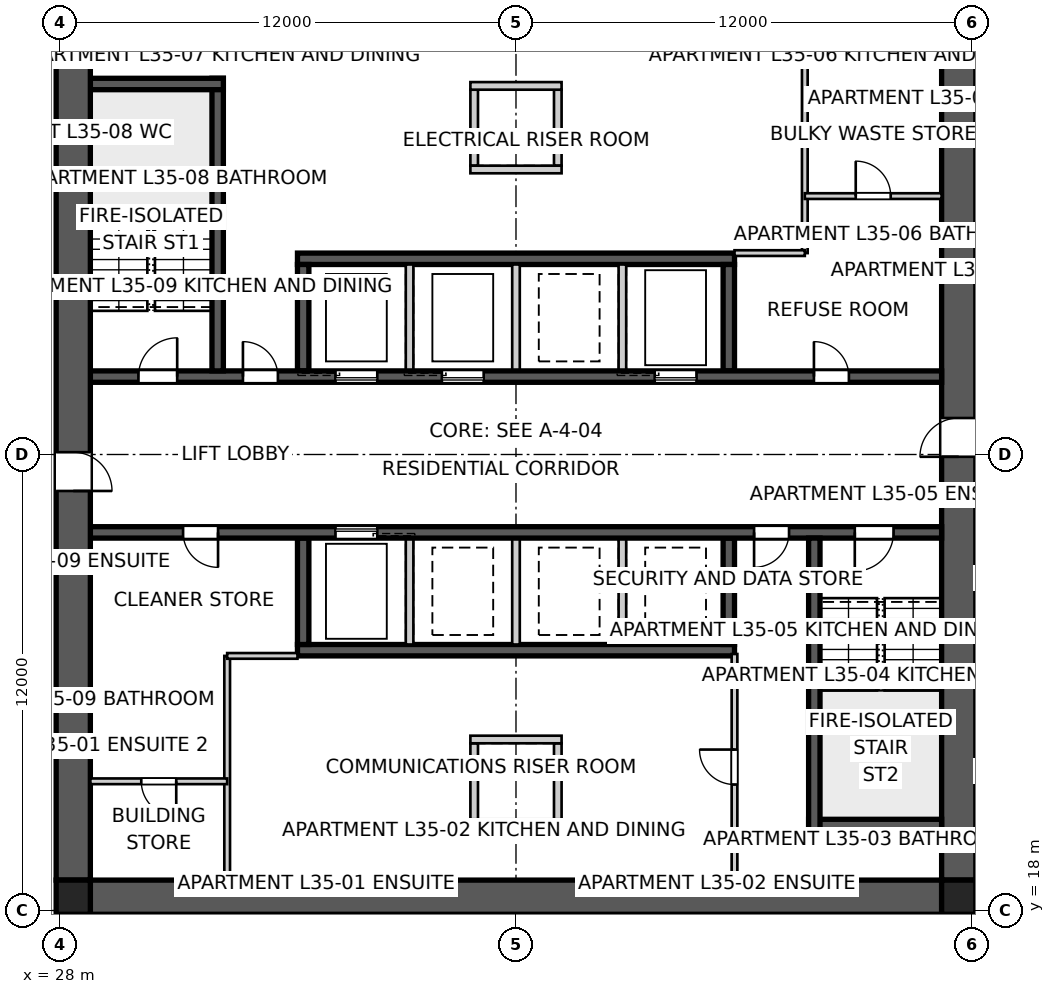
"""IFC4 building model, lengths in metres.
Left out: names, types, materials, properties, quantities, classifications, styles, units other than length and angle.
Written with IfcOpenShell. Run it as: python <this file> out.ifc"""

import sys

from ifc_helpers import new_model, si_unit, direction, frame, frame_2d, origin, origin_2d, place, context, subcontext, project, spatial, polyline, rectangle, outline, extrude, element, fill, save


model = new_model("IFC4")
c1 = context("Model", 3, precision=1e-05, world=origin(), true_north=direction((0.0, 1.0)))
c2 = subcontext(c1, "Body", "Model", "MODEL_VIEW")
j1 = project(units=[si_unit("LENGTHUNIT", "METRE"), si_unit("PLANEANGLEUNIT", "RADIAN")], contexts=[c1])
p1 = place(None, origin())
s1 = spatial("IfcSite", under=j1, at=p1, CompositionType="ELEMENT")
p2 = place(p1, origin())
s2 = spatial("IfcBuilding", under=s1, at=p2, CompositionType="ELEMENT")
p3 = place(p2, frame((0.0, 0.0, 128.6)))
s3 = spatial("IfcBuildingStorey", under=s2, at=p3, CompositionType="ELEMENT", Elevation=128.6)
p4 = place(p3, frame((51.2, 18.35, 0.0), z_axis=(0.0, 0.0, 1.0), x_axis=(-1.0, 0.0, 0.0)))
e1 = element("IfcWall", 1, at=p4, inside=s3, PredefinedType="SHEAR", context=c2, shape_type="SweptSolid", body=[
    extrude(outline(polyline([(0.0, -0.45), (22.4, -0.45), (22.4, -0.025), (22.85, -0.025), (22.85, 0.025), (22.4, 0.025), (22.4, 0.45), (0.0, 0.45), (0.0, 0.025), (-0.45, 0.025), (-0.45, -0.025), (0.0, -0.025), (0.0, -0.45)])), origin(), (0.0, 0.0, 1.0), 3.4),
])
p5 = place(p3, frame((51.65, 18.8, 0.0), z_axis=(0.0, 0.0, 1.0), x_axis=(0.0, 1.0, 0.0)))
e2 = element("IfcWall", 2, at=p5, inside=s3, PredefinedType="SHEAR", context=c2, shape_type="SweptSolid", body=[
    extrude(outline(polyline([(0.0, -0.45), (22.4, -0.45), (22.4, -0.025), (22.85, -0.025), (22.85, 0.025), (22.4, 0.025), (22.4, 0.45), (0.0, 0.45), (0.0, 0.025), (-0.45, 0.025), (-0.45, -0.025), (0.0, -0.025), (0.0, -0.45)])), origin(), (0.0, 0.0, 1.0), 3.4),
])
p6 = place(p5, frame((11.14, 0.0, 0.0)))
e3 = element("IfcOpeningElement", 3, at=p6, cuts=e2, PredefinedType="OPENING", context=c2, shape_type="SweptSolid", body=[
    extrude(rectangle(XDim=1.02, YDim=2.4, at=frame_2d((0.51, 1.2))), frame((0.0, 0.46, 0.0), z_axis=(0.0, -1.0, 0.0), x_axis=(1.0, 0.0, 0.0)), (0.0, 0.0, 1.0), 0.92),
])
p7 = place(p3, frame((28.35, 41.2, 0.0), z_axis=(0.0, 0.0, 1.0), x_axis=(0.0, -1.0, 0.0)))
e4 = element("IfcWall", 4, at=p7, inside=s3, PredefinedType="SHEAR", context=c2, shape_type="SweptSolid", body=[
    extrude(outline(polyline([(0.0, -0.45), (22.4, -0.45), (22.4, -0.025), (22.85, -0.025), (22.85, 0.025), (22.4, 0.025), (22.4, 0.45), (0.0, 0.45), (0.0, 0.025), (-0.45, 0.025), (-0.45, -0.025), (0.0, -0.025), (0.0, -0.45)])), origin(), (0.0, 0.0, 1.0), 3.4),
])
p8 = place(p7, frame((11.14, 0.0, 0.0)))
e5 = element("IfcOpeningElement", 5, at=p8, cuts=e4, PredefinedType="OPENING", context=c2, shape_type="SweptSolid", body=[
    extrude(rectangle(XDim=1.02, YDim=2.4, at=frame_2d((0.51, 1.2))), frame((0.0, 0.46, 0.0), z_axis=(0.0, -1.0, 0.0), x_axis=(1.0, 0.0, 0.0)), (0.0, 0.0, 1.0), 0.92),
])
p9 = place(p3, frame((28.8, 32.05, 0.0), z_axis=(0.0, 0.0, 1.0), x_axis=(1.0, 0.0, 0.0)))
e6 = element("IfcWall", 6, at=p9, inside=s3, PredefinedType="SHEAR", context=c2, shape_type="SweptSolid", body=[
    extrude(rectangle(XDim=22.4, YDim=0.3, at=frame_2d((11.2, 0.0))), origin(), (0.0, 0.0, 1.0), 3.4),
])
p10 = place(p9, frame((19.04, 0.0, 0.0)))
e7 = element("IfcOpeningElement", 7, at=p10, cuts=e6, PredefinedType="OPENING", context=c2, shape_type="SweptSolid", body=[
    extrude(rectangle(XDim=0.92, YDim=2.1, at=frame_2d((0.46, 1.05))), frame((0.0, 0.16, 0.0), z_axis=(0.0, -1.0, 0.0), x_axis=(1.0, 0.0, 0.0)), (0.0, 0.0, 1.0), 0.32),
])
p11 = place(p9, frame((1.265, 0.0, 0.0)))
e8 = element("IfcOpeningElement", 8, at=p11, cuts=e6, PredefinedType="OPENING", context=c2, shape_type="SweptSolid", body=[
    extrude(rectangle(XDim=1.02, YDim=2.1, at=frame_2d((0.51, 1.05))), frame((0.0, 0.16, 0.0), z_axis=(0.0, -1.0, 0.0), x_axis=(1.0, 0.0, 0.0)), (0.0, 0.0, 1.0), 0.32),
])
p12 = place(p9, frame((4.015, 0.0, 0.0)))
e9 = element("IfcOpeningElement", 9, at=p12, cuts=e6, PredefinedType="OPENING", context=c2, shape_type="SweptSolid", body=[
    extrude(rectangle(XDim=0.92, YDim=2.1, at=frame_2d((0.46, 1.05))), frame((0.0, 0.16, 0.0), z_axis=(0.0, -1.0, 0.0), x_axis=(1.0, 0.0, 0.0)), (0.0, 0.0, 1.0), 0.32),
])
p13 = place(p9, frame((6.45, 0.0, 0.0)))
e10 = element("IfcOpeningElement", 10, at=p13, cuts=e6, PredefinedType="OPENING", context=c2, shape_type="SweptSolid", body=[
    extrude(rectangle(XDim=1.1, YDim=2.1, at=frame_2d((0.55, 1.05))), frame((0.0, 0.16, 0.0), z_axis=(0.0, -1.0, 0.0), x_axis=(1.0, 0.0, 0.0)), (0.0, 0.0, 1.0), 0.32),
])
p14 = place(p9, frame((9.25, 0.0, 0.0)))
e11 = element("IfcOpeningElement", 11, at=p14, cuts=e6, PredefinedType="OPENING", context=c2, shape_type="SweptSolid", body=[
    extrude(rectangle(XDim=1.1, YDim=2.1, at=frame_2d((0.55, 1.05))), frame((0.0, 0.16, 0.0), z_axis=(0.0, -1.0, 0.0), x_axis=(1.0, 0.0, 0.0)), (0.0, 0.0, 1.0), 0.32),
])
p15 = place(p9, frame((14.85, 0.0, 0.0)))
e12 = element("IfcOpeningElement", 12, at=p15, cuts=e6, PredefinedType="OPENING", context=c2, shape_type="SweptSolid", body=[
    extrude(rectangle(XDim=1.1, YDim=2.1, at=frame_2d((0.55, 1.05))), frame((0.0, 0.16, 0.0), z_axis=(0.0, -1.0, 0.0), x_axis=(1.0, 0.0, 0.0)), (0.0, 0.0, 1.0), 0.32),
])
p16 = place(p3, frame((51.2, 27.95, 0.0), z_axis=(0.0, 0.0, 1.0), x_axis=(-1.0, 0.0, 0.0)))
e13 = element("IfcWall", 13, at=p16, inside=s3, PredefinedType="SHEAR", context=c2, shape_type="SweptSolid", body=[
    extrude(rectangle(XDim=22.4, YDim=0.3, at=frame_2d((11.2, 0.0))), origin(), (0.0, 0.0, 1.0), 3.4),
])
p17 = place(p16, frame((19.04, 0.0, 0.0)))
e14 = element("IfcOpeningElement", 14, at=p17, cuts=e13, PredefinedType="OPENING", context=c2, shape_type="SweptSolid", body=[
    extrude(rectangle(XDim=0.92, YDim=2.1, at=frame_2d((0.46, 1.05))), frame((0.0, 0.16, 0.0), z_axis=(0.0, -1.0, 0.0), x_axis=(1.0, 0.0, 0.0)), (0.0, 0.0, 1.0), 0.32),
])
p18 = place(p16, frame((1.265, 0.0, 0.0)))
e15 = element("IfcOpeningElement", 15, at=p18, cuts=e13, PredefinedType="OPENING", context=c2, shape_type="SweptSolid", body=[
    extrude(rectangle(XDim=1.02, YDim=2.1, at=frame_2d((0.51, 1.05))), frame((0.0, 0.16, 0.0), z_axis=(0.0, -1.0, 0.0), x_axis=(1.0, 0.0, 0.0)), (0.0, 0.0, 1.0), 0.32),
])
p19 = place(p16, frame((4.015, 0.0, 0.0)))
e16 = element("IfcOpeningElement", 16, at=p19, cuts=e13, PredefinedType="OPENING", context=c2, shape_type="SweptSolid", body=[
    extrude(rectangle(XDim=0.92, YDim=2.1, at=frame_2d((0.46, 1.05))), frame((0.0, 0.16, 0.0), z_axis=(0.0, -1.0, 0.0), x_axis=(1.0, 0.0, 0.0)), (0.0, 0.0, 1.0), 0.32),
])
p20 = place(p16, frame((14.85, 0.0, 0.0)))
e17 = element("IfcOpeningElement", 17, at=p20, cuts=e13, PredefinedType="OPENING", context=c2, shape_type="SweptSolid", body=[
    extrude(rectangle(XDim=1.1, YDim=2.1, at=frame_2d((0.55, 1.05))), frame((0.0, 0.16, 0.0), z_axis=(0.0, -1.0, 0.0), x_axis=(1.0, 0.0, 0.0)), (0.0, 0.0, 1.0), 0.32),
])
for number, where, z_axis, x_axis in (
    (18, (34.25, 35.15, 0.0), (0.0, 0.0, 1.0), (1.0, 0.0, 0.0)),
    (19, (45.75, 24.85, 0.0), (0.0, 0.0, 1.0), (-1.0, 0.0, 0.0)),
):
    element("IfcWall", number, at=place(p3, frame(where, z_axis=z_axis, x_axis=x_axis)), inside=s3, PredefinedType="SHEAR", context=c2, shape_type="SweptSolid", body=[
        extrude(rectangle(XDim=11.5, YDim=0.3, at=frame_2d((5.75, 0.0))), origin(), (0.0, 0.0, 1.0), 3.4),
    ])
for number, where, z_axis, x_axis in (
    (20, (34.4, 32.2, 0.0), (0.0, 0.0, 1.0), (0.0, 1.0, 0.0)),
    (21, (45.6, 27.8, 0.0), (0.0, 0.0, 1.0), (0.0, -1.0, 0.0)),
):
    element("IfcWall", number, at=place(p3, frame(where, z_axis=z_axis, x_axis=x_axis)), inside=s3, PredefinedType="SHEAR", context=c2, shape_type="SweptSolid", body=[
        extrude(rectangle(XDim=2.8, YDim=0.3, at=frame_2d((1.4, 0.0))), origin(), (0.0, 0.0, 1.0), 3.4),
    ])
for number, where, z_axis, x_axis in (
    (22, (37.2, 32.2, 0.0), (0.0, 0.0, 1.0), (0.0, 1.0, 0.0)),
    (23, (42.8, 27.8, 0.0), (0.0, 0.0, 1.0), (0.0, -1.0, 0.0)),
    (24, (40.0, 32.2, 0.0), (0.0, 0.0, 1.0), (0.0, 1.0, 0.0)),
    (25, (40.0, 27.8, 0.0), (0.0, 0.0, 1.0), (0.0, -1.0, 0.0)),
    (26, (42.8, 32.2, 0.0), (0.0, 0.0, 1.0), (0.0, 1.0, 0.0)),
    (27, (37.2, 27.8, 0.0), (0.0, 0.0, 1.0), (0.0, -1.0, 0.0)),
):
    element("IfcWall", number, at=place(p3, frame(where, z_axis=z_axis, x_axis=x_axis)), inside=s3, PredefinedType="SOLIDWALL", context=c2, shape_type="SweptSolid", body=[
        extrude(rectangle(XDim=2.8, YDim=0.2, at=frame_2d((1.4, 0.0))), origin(), (0.0, 0.0, 1.0), 3.4),
    ])
for number, where, z_axis, x_axis in (
    (28, (45.6, 32.2, 0.0), (0.0, 0.0, 1.0), (0.0, 1.0, 0.0)),
    (29, (34.4, 27.8, 0.0), (0.0, 0.0, 1.0), (0.0, -1.0, 0.0)),
):
    element("IfcWall", number, at=place(p3, frame(where, z_axis=z_axis, x_axis=x_axis)), inside=s3, PredefinedType="SHEAR", context=c2, shape_type="SweptSolid", body=[
        extrude(rectangle(XDim=2.8, YDim=0.3, at=frame_2d((1.4, 0.0))), origin(), (0.0, 0.0, 1.0), 3.4),
    ])
p21 = place(p3, frame((32.15, 32.2, 0.0), z_axis=(0.0, 0.0, 1.0), x_axis=(0.0, 1.0, 0.0)))
e30 = element("IfcWall", 30, at=p21, inside=s3, PredefinedType="SHEAR", context=c2, shape_type="SweptSolid", body=[
    extrude(rectangle(XDim=7.7, YDim=0.3, at=frame_2d((3.85, 0.0))), origin(), (0.0, 0.0, 1.0), 3.4),
])
p22 = place(p3, frame((28.8, 39.75, 0.0), z_axis=(0.0, 0.0, 1.0), x_axis=(1.0, 0.0, 0.0)))
e31 = element("IfcWall", 31, at=p22, inside=s3, PredefinedType="SHEAR", context=c2, shape_type="SweptSolid", body=[
    extrude(rectangle(XDim=3.5, YDim=0.3, at=frame_2d((1.75, 0.0))), origin(), (0.0, 0.0, 1.0), 3.4),
])
p23 = place(p3, frame((47.85, 27.8, 0.0), z_axis=(0.0, 0.0, 1.0), x_axis=(0.0, -1.0, 0.0)))
e32 = element("IfcWall", 32, at=p23, inside=s3, PredefinedType="SHEAR", context=c2, shape_type="SweptSolid", body=[
    extrude(rectangle(XDim=7.7, YDim=0.3, at=frame_2d((3.85, 0.0))), origin(), (0.0, 0.0, 1.0), 3.4),
])
p24 = place(p3, frame((51.2, 20.25, 0.0), z_axis=(0.0, 0.0, 1.0), x_axis=(-1.0, 0.0, 0.0)))
e33 = element("IfcWall", 33, at=p24, inside=s3, PredefinedType="SHEAR", context=c2, shape_type="SweptSolid", body=[
    extrude(rectangle(XDim=3.5, YDim=0.3, at=frame_2d((1.75, 0.0))), origin(), (0.0, 0.0, 1.0), 3.4),
])
for number, where, z_axis, x_axis in (
    (34, (38.9, 37.6, 0.0), (0.0, 0.0, 1.0), (0.0, 1.0, 0.0)),
    (35, (41.1, 37.6, 0.0), (0.0, 0.0, 1.0), (0.0, 1.0, 0.0)),
):
    element("IfcWall", number, at=place(p3, frame(where, z_axis=z_axis, x_axis=x_axis)), inside=s3, PredefinedType="SOLIDWALL", context=c2, shape_type="SweptSolid", body=[
        extrude(rectangle(XDim=2.0, YDim=0.2, at=frame_2d((1.0, 0.0))), origin(), (0.0, 0.0, 1.0), 3.4),
    ])
for number, where, z_axis, x_axis in (
    (36, (38.8, 37.5, 0.0), (0.0, 0.0, 1.0), (1.0, 0.0, 0.0)),
    (37, (38.8, 39.7, 0.0), (0.0, 0.0, 1.0), (1.0, 0.0, 0.0)),
):
    element("IfcWall", number, at=place(p3, frame(where, z_axis=z_axis, x_axis=x_axis)), inside=s3, PredefinedType="SOLIDWALL", context=c2, shape_type="SweptSolid", body=[
        extrude(rectangle(XDim=2.4, YDim=0.2, at=frame_2d((1.2, 0.0))), origin(), (0.0, 0.0, 1.0), 3.4),
    ])
for number, where, z_axis, x_axis in (
    (38, (38.9, 22.4, 0.0), (0.0, 0.0, 1.0), (0.0, -1.0, 0.0)),
    (39, (41.1, 22.4, 0.0), (0.0, 0.0, 1.0), (0.0, -1.0, 0.0)),
):
    element("IfcWall", number, at=place(p3, frame(where, z_axis=z_axis, x_axis=x_axis)), inside=s3, PredefinedType="SOLIDWALL", context=c2, shape_type="SweptSolid", body=[
        extrude(rectangle(XDim=2.0, YDim=0.2, at=frame_2d((1.0, 0.0))), origin(), (0.0, 0.0, 1.0), 3.4),
    ])
for number, where, z_axis, x_axis in (
    (40, (38.8, 22.5, 0.0), (0.0, 0.0, 1.0), (1.0, 0.0, 0.0)),
    (41, (38.8, 20.3, 0.0), (0.0, 0.0, 1.0), (1.0, 0.0, 0.0)),
):
    element("IfcWall", number, at=place(p3, frame(where, z_axis=z_axis, x_axis=x_axis)), inside=s3, PredefinedType="SOLIDWALL", context=c2, shape_type="SweptSolid", body=[
        extrude(rectangle(XDim=2.4, YDim=0.2, at=frame_2d((1.2, 0.0))), origin(), (0.0, 0.0, 1.0), 3.4),
    ])
for number, where, z_axis, x_axis in (
    (42, (28.35, 18.35, 0.0), (0.0, 0.0, 1.0), (1.0, 0.0, 0.0)),
    (43, (51.65, 18.35, 0.0), (0.0, 0.0, 1.0), (1.0, 0.0, 0.0)),
):
    element("IfcColumn", number, at=place(p3, frame(where, z_axis=z_axis, x_axis=x_axis)), inside=s3, PredefinedType="COLUMN", context=c2, shape_type="SweptSolid", body=[
        extrude(rectangle(XDim=0.9, YDim=0.9, at=origin_2d()), origin(), (0.0, 0.0, 1.0), 3.4),
    ])
p25 = place(p3, frame((47.6, 41.2, 0.0), z_axis=(0.0, 0.0, 1.0), x_axis=(0.0, -1.0, 0.0)))
e44 = element("IfcWall", 44, at=p25, inside=s3, PredefinedType="SOLIDWALL", context=c2, shape_type="SweptSolid", body=[
    extrude(rectangle(XDim=5.9, YDim=0.15, at=frame_2d((2.95, 0.0))), origin(), (0.0, 0.0, 1.0), 3.25),
])
p26 = place(p3, frame((47.6, 35.3, 0.0), z_axis=(0.0, 0.0, 1.0), x_axis=(-1.0, 0.0, 0.0)))
e45 = element("IfcWall", 45, at=p26, inside=s3, PredefinedType="SOLIDWALL", context=c2, shape_type="SweptSolid", body=[
    extrude(rectangle(XDim=1.85, YDim=0.15, at=frame_2d((0.925, 0.0))), origin(), (0.0, 0.0, 1.0), 3.25),
])
p27 = place(p3, frame((47.6, 36.8, 0.0), z_axis=(0.0, 0.0, 1.0), x_axis=(1.0, 0.0, 0.0)))
e46 = element("IfcWall", 46, at=p27, inside=s3, PredefinedType="SOLIDWALL", context=c2, shape_type="SweptSolid", body=[
    extrude(rectangle(XDim=3.6, YDim=0.15, at=frame_2d((1.8, 0.0))), origin(), (0.0, 0.0, 1.0), 3.25),
])
p28 = place(p27, frame((1.34, 0.0, 0.0)))
e47 = element("IfcOpeningElement", 47, at=p28, cuts=e46, PredefinedType="OPENING", context=c2, shape_type="SweptSolid", body=[
    extrude(rectangle(XDim=0.92, YDim=2.1, at=frame_2d((0.46, 1.05))), frame((0.0, 0.085, 0.0), z_axis=(0.0, -1.0, 0.0), x_axis=(1.0, 0.0, 0.0)), (0.0, 0.0, 1.0), 0.17),
])
p29 = place(p3, frame((45.75, 18.8, 0.0), z_axis=(0.0, 0.0, 1.0), x_axis=(0.0, 1.0, 0.0)))
e48 = element("IfcWall", 48, at=p29, inside=s3, PredefinedType="SOLIDWALL", context=c2, shape_type="SweptSolid", body=[
    extrude(rectangle(XDim=5.95, YDim=0.15, at=frame_2d((2.975, 0.0))), origin(), (0.0, 0.0, 1.0), 3.25),
])
p30 = place(p29, frame((2.515, 0.0, 0.0)))
e49 = element("IfcOpeningElement", 49, at=p30, cuts=e48, PredefinedType="OPENING", context=c2, shape_type="SweptSolid", body=[
    extrude(rectangle(XDim=0.92, YDim=2.1, at=frame_2d((0.46, 1.05))), frame((0.0, 0.085, 0.0), z_axis=(0.0, -1.0, 0.0), x_axis=(1.0, 0.0, 0.0)), (0.0, 0.0, 1.0), 0.17),
])
p31 = place(p3, frame((32.4, 18.8, 0.0), z_axis=(0.0, 0.0, 1.0), x_axis=(0.0, 1.0, 0.0)))
e50 = element("IfcWall", 50, at=p31, inside=s3, PredefinedType="SOLIDWALL", context=c2, shape_type="SweptSolid", body=[
    extrude(rectangle(XDim=5.9, YDim=0.15, at=frame_2d((2.95, 0.0))), origin(), (0.0, 0.0, 1.0), 3.25),
])
p32 = place(p3, frame((32.4, 24.7, 0.0), z_axis=(0.0, 0.0, 1.0), x_axis=(1.0, 0.0, 0.0)))
e51 = element("IfcWall", 51, at=p32, inside=s3, PredefinedType="SOLIDWALL", context=c2, shape_type="SweptSolid", body=[
    extrude(rectangle(XDim=1.85, YDim=0.15, at=frame_2d((0.925, 0.0))), origin(), (0.0, 0.0, 1.0), 3.25),
])
p33 = place(p3, frame((32.4, 21.4, 0.0), z_axis=(0.0, 0.0, 1.0), x_axis=(-1.0, 0.0, 0.0)))
e52 = element("IfcWall", 52, at=p33, inside=s3, PredefinedType="SOLIDWALL", context=c2, shape_type="SweptSolid", body=[
    extrude(rectangle(XDim=3.6, YDim=0.15, at=frame_2d((1.8, 0.0))), origin(), (0.0, 0.0, 1.0), 3.25),
])
p34 = place(p33, frame((1.34, 0.0, 0.0)))
e53 = element("IfcOpeningElement", 53, at=p34, cuts=e52, PredefinedType="OPENING", context=c2, shape_type="SweptSolid", body=[
    extrude(rectangle(XDim=0.92, YDim=2.1, at=frame_2d((0.46, 1.05))), frame((0.0, 0.085, 0.0), z_axis=(0.0, -1.0, 0.0), x_axis=(1.0, 0.0, 0.0)), (0.0, 0.0, 1.0), 0.17),
])
p35 = place(p10, origin())
e54 = element("IfcDoor", 54, at=p35, inside=s3, OperationType="SINGLE_SWING_LEFT", PredefinedType="DOOR", context=c2, shape_type="SweptSolid", body=[
    extrude(rectangle(XDim=0.92, YDim=2.1, at=frame_2d((0.46, 1.05))), frame((0.0, 0.025, 0.0), z_axis=(0.0, -1.0, 0.0), x_axis=(1.0, 0.0, 0.0)), (0.0, 0.0, 1.0), 0.05),
])
fill(e7, e54)
p36 = place(p17, origin())
e55 = element("IfcDoor", 55, at=p36, inside=s3, OperationType="SINGLE_SWING_LEFT", PredefinedType="DOOR", context=c2, shape_type="SweptSolid", body=[
    extrude(rectangle(XDim=0.92, YDim=2.1, at=frame_2d((0.46, 1.05))), frame((0.0, 0.025, 0.0), z_axis=(0.0, -1.0, 0.0), x_axis=(1.0, 0.0, 0.0)), (0.0, 0.0, 1.0), 0.05),
])
fill(e14, e55)
p37 = place(p18, origin())
e56 = element("IfcDoor", 56, at=p37, inside=s3, OperationType="SINGLE_SWING_RIGHT", PredefinedType="DOOR", context=c2, shape_type="SweptSolid", body=[
    extrude(rectangle(XDim=1.02, YDim=2.1, at=frame_2d((0.51, 1.05))), frame((0.0, 0.025, 0.0), z_axis=(0.0, -1.0, 0.0), x_axis=(1.0, 0.0, 0.0)), (0.0, 0.0, 1.0), 0.05),
])
fill(e15, e56)
p38 = place(p11, origin())
e57 = element("IfcDoor", 57, at=p38, inside=s3, OperationType="SINGLE_SWING_RIGHT", PredefinedType="DOOR", context=c2, shape_type="SweptSolid", body=[
    extrude(rectangle(XDim=1.02, YDim=2.1, at=frame_2d((0.51, 1.05))), frame((0.0, 0.025, 0.0), z_axis=(0.0, -1.0, 0.0), x_axis=(1.0, 0.0, 0.0)), (0.0, 0.0, 1.0), 0.05),
])
fill(e8, e57)
p39 = place(p12, origin())
e58 = element("IfcDoor", 58, at=p39, inside=s3, OperationType="SINGLE_SWING_LEFT", PredefinedType="DOOR", context=c2, shape_type="SweptSolid", body=[
    extrude(rectangle(XDim=0.92, YDim=2.1, at=frame_2d((0.46, 1.05))), frame((0.0, 0.025, 0.0), z_axis=(0.0, -1.0, 0.0), x_axis=(1.0, 0.0, 0.0)), (0.0, 0.0, 1.0), 0.05),
])
fill(e9, e58)
p40 = place(p19, origin())
e59 = element("IfcDoor", 59, at=p40, inside=s3, OperationType="SINGLE_SWING_RIGHT", PredefinedType="DOOR", context=c2, shape_type="SweptSolid", body=[
    extrude(rectangle(XDim=0.92, YDim=2.1, at=frame_2d((0.46, 1.05))), frame((0.0, 0.025, 0.0), z_axis=(0.0, -1.0, 0.0), x_axis=(1.0, 0.0, 0.0)), (0.0, 0.0, 1.0), 0.05),
])
fill(e16, e59)
p41 = place(p28, origin())
e60 = element("IfcDoor", 60, at=p41, inside=s3, OperationType="SINGLE_SWING_LEFT", PredefinedType="DOOR", context=c2, shape_type="SweptSolid", body=[
    extrude(rectangle(XDim=0.92, YDim=2.1, at=frame_2d((0.46, 1.05))), frame((0.0, 0.025, 0.0), z_axis=(0.0, -1.0, 0.0), x_axis=(1.0, 0.0, 0.0)), (0.0, 0.0, 1.0), 0.05),
])
fill(e47, e60)
p42 = place(p34, origin())
e61 = element("IfcDoor", 61, at=p42, inside=s3, OperationType="SINGLE_SWING_LEFT", PredefinedType="DOOR", context=c2, shape_type="SweptSolid", body=[
    extrude(rectangle(XDim=0.92, YDim=2.1, at=frame_2d((0.46, 1.05))), frame((0.0, 0.025, 0.0), z_axis=(0.0, -1.0, 0.0), x_axis=(1.0, 0.0, 0.0)), (0.0, 0.0, 1.0), 0.05),
])
fill(e53, e61)
p43 = place(p30, origin())
e62 = element("IfcDoor", 62, at=p43, inside=s3, OperationType="SINGLE_SWING_RIGHT", PredefinedType="DOOR", context=c2, shape_type="SweptSolid", body=[
    extrude(rectangle(XDim=0.92, YDim=2.1, at=frame_2d((0.46, 1.05))), frame((0.0, 0.025, 0.0), z_axis=(0.0, -1.0, 0.0), x_axis=(1.0, 0.0, 0.0)), (0.0, 0.0, 1.0), 0.05),
])
fill(e49, e62)
p44 = place(p6, origin())
e63 = element("IfcDoor", 63, at=p44, inside=s3, OperationType="SINGLE_SWING_LEFT", PredefinedType="DOOR", context=c2, shape_type="SweptSolid", body=[
    extrude(rectangle(XDim=1.02, YDim=2.4, at=frame_2d((0.51, 1.2))), frame((0.0, 0.025, 0.0), z_axis=(0.0, -1.0, 0.0), x_axis=(1.0, 0.0, 0.0)), (0.0, 0.0, 1.0), 0.05),
])
fill(e3, e63)
p45 = place(p8, origin())
e64 = element("IfcDoor", 64, at=p45, inside=s3, OperationType="SINGLE_SWING_RIGHT", PredefinedType="DOOR", context=c2, shape_type="SweptSolid", body=[
    extrude(rectangle(XDim=1.02, YDim=2.4, at=frame_2d((0.51, 1.2))), frame((0.0, 0.025, 0.0), z_axis=(0.0, -1.0, 0.0), x_axis=(1.0, 0.0, 0.0)), (0.0, 0.0, 1.0), 0.05),
])
fill(e5, e64)
p46 = place(p13, origin())
e65 = element("IfcDoor", 65, at=p46, inside=s3, OperationType="SLIDING_TO_LEFT", PredefinedType="DOOR", context=c2, shape_type="SweptSolid", body=[
    extrude(rectangle(XDim=1.1, YDim=2.1, at=frame_2d((0.55, 1.05))), frame((0.0, 0.025, 0.0), z_axis=(0.0, -1.0, 0.0), x_axis=(1.0, 0.0, 0.0)), (0.0, 0.0, 1.0), 0.05),
])
fill(e10, e65)
p47 = place(p14, origin())
e66 = element("IfcDoor", 66, at=p47, inside=s3, OperationType="SLIDING_TO_LEFT", PredefinedType="DOOR", context=c2, shape_type="SweptSolid", body=[
    extrude(rectangle(XDim=1.1, YDim=2.1, at=frame_2d((0.55, 1.05))), frame((0.0, 0.025, 0.0), z_axis=(0.0, -1.0, 0.0), x_axis=(1.0, 0.0, 0.0)), (0.0, 0.0, 1.0), 0.05),
])
fill(e11, e66)
p48 = place(p15, origin())
e67 = element("IfcDoor", 67, at=p48, inside=s3, OperationType="SLIDING_TO_LEFT", PredefinedType="DOOR", context=c2, shape_type="SweptSolid", body=[
    extrude(rectangle(XDim=1.1, YDim=2.1, at=frame_2d((0.55, 1.05))), frame((0.0, 0.025, 0.0), z_axis=(0.0, -1.0, 0.0), x_axis=(1.0, 0.0, 0.0)), (0.0, 0.0, 1.0), 0.05),
])
fill(e12, e67)
p49 = place(p20, origin())
e68 = element("IfcDoor", 68, at=p49, inside=s3, OperationType="SLIDING_TO_LEFT", PredefinedType="DOOR", context=c2, shape_type="SweptSolid", body=[
    extrude(rectangle(XDim=1.1, YDim=2.1, at=frame_2d((0.55, 1.05))), frame((0.0, 0.025, 0.0), z_axis=(0.0, -1.0, 0.0), x_axis=(1.0, 0.0, 0.0)), (0.0, 0.0, 1.0), 0.05),
])
fill(e17, e68)
save(model, sys.argv[1])
